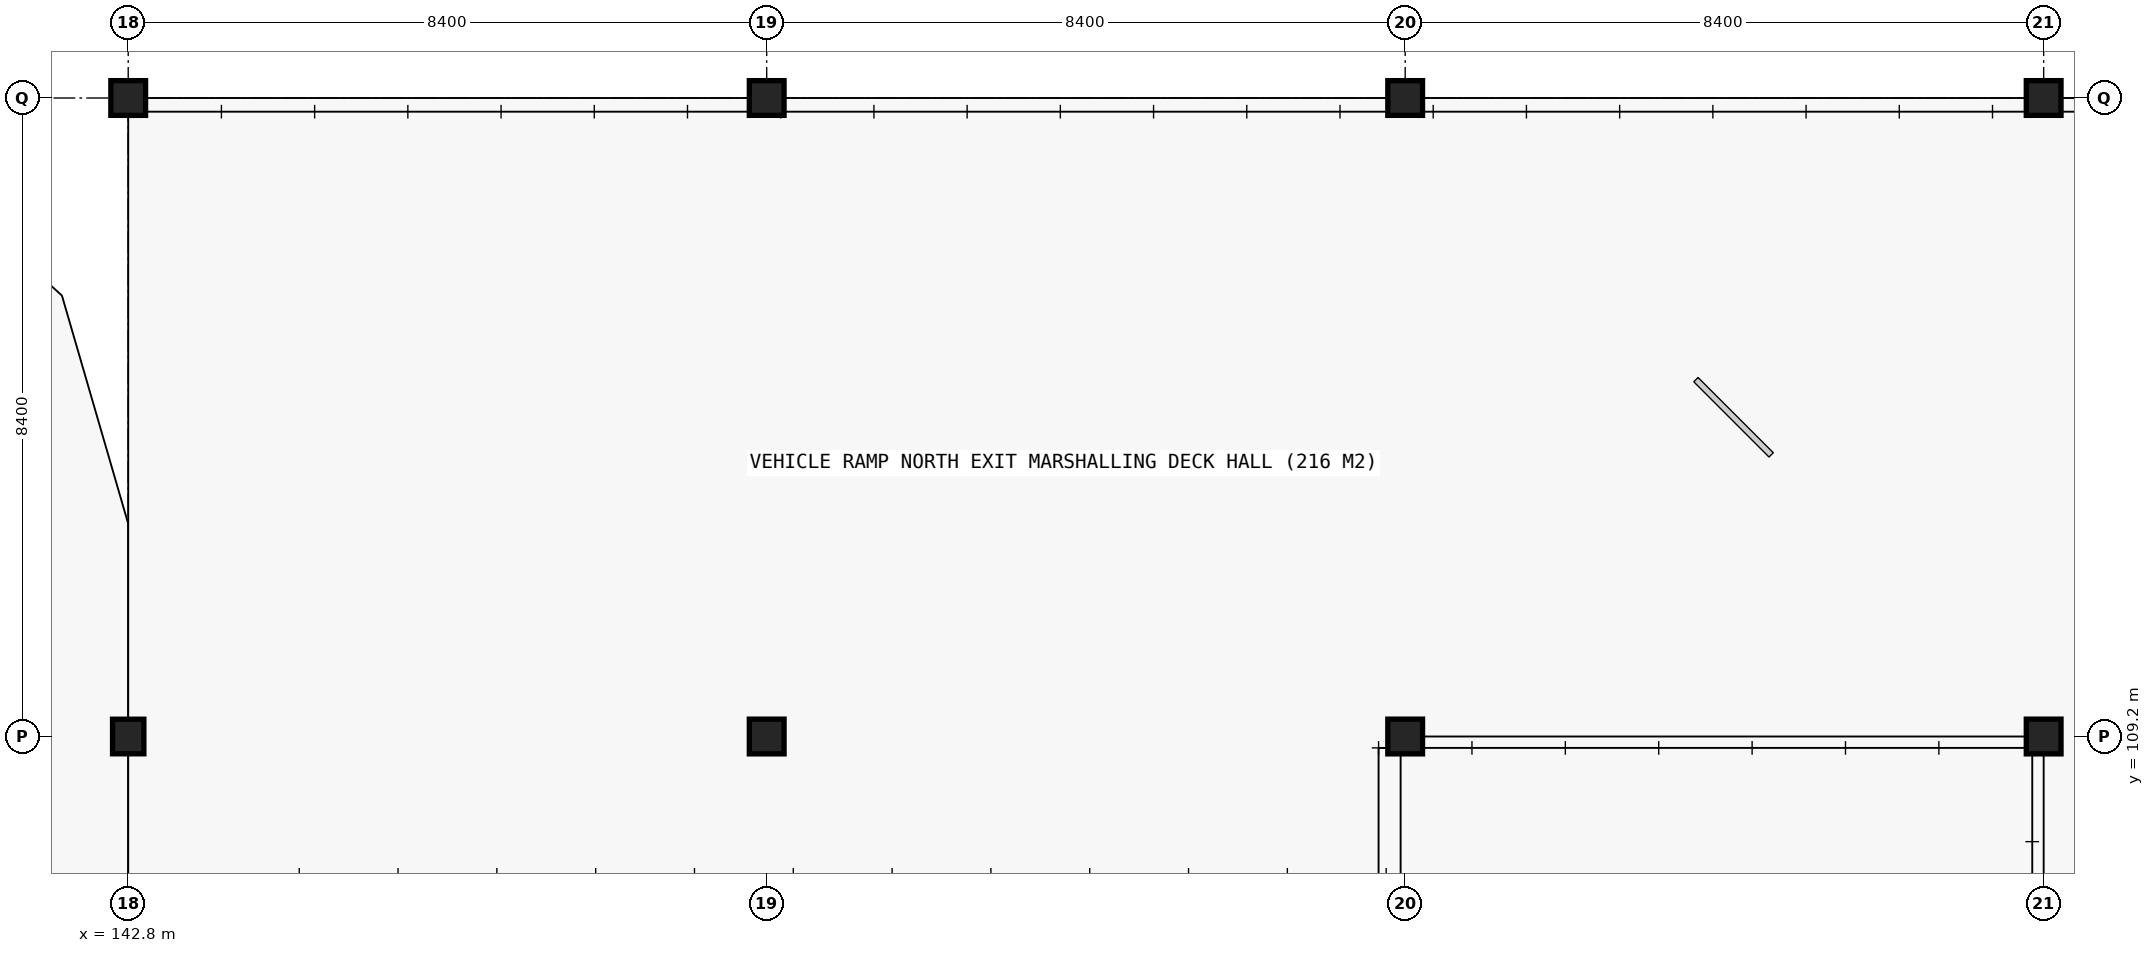
"""IFC4 building model, lengths in metres.
Left out: names, types, materials, properties, quantities, classifications, styles, units other than length and angle.
Written with IfcOpenShell. Run it as: python <this file> out.ifc"""

import sys

from ifc_helpers import new_model, si_unit, direction, frame, origin, origin_2d, place, context, subcontext, project, spatial, hollow_circle, i_section, extrude, element, save


model = new_model("IFC4")
c1 = context("Model", 3, precision=1e-05, world=origin(), true_north=direction((0.0, 1.0)))
c2 = subcontext(c1, "Body", "Model", "MODEL_VIEW")
j1 = project(units=[si_unit("LENGTHUNIT", "METRE"), si_unit("PLANEANGLEUNIT", "RADIAN")], contexts=[c1])
p1 = place(None, origin())
s1 = spatial("IfcSite", under=j1, at=p1, CompositionType="ELEMENT")
p2 = place(p1, origin())
s2 = spatial("IfcBuilding", under=s1, at=p2, CompositionType="ELEMENT")
p3 = place(p2, origin())
s3 = spatial("IfcBuildingStorey", under=s2, at=p3, CompositionType="ELEMENT", Elevation=0.0)
p4 = place(p3, frame((142.8, 109.2, 0.0), z_axis=(0.0, 0.0, 1.0), x_axis=(1.0, 0.0, 0.0)))
e1 = element("IfcColumn", 1, at=p4, inside=s3, PredefinedType="COLUMN", context=c2, shape_type="SweptSolid", body=[
    extrude(i_section(OverallWidth=0.412, OverallDepth=0.455, WebThickness=0.031, FlangeThickness=0.049, FilletRadius=0.015, at=origin_2d()), origin(), (0.0, 0.0, 1.0), 4.8),
])
for number, where, z_axis, x_axis in (
    (2, (142.8, 117.6, 0.0), (0.0, 0.0, 1.0), (1.0, 0.0, 0.0)),
    (3, (151.2, 109.2, 0.0), (0.0, 0.0, 1.0), (1.0, 0.0, 0.0)),
    (4, (151.2, 117.6, 0.0), (0.0, 0.0, 1.0), (1.0, 0.0, 0.0)),
    (5, (159.6, 109.2, 0.0), (0.0, 0.0, 1.0), (1.0, 0.0, 0.0)),
    (6, (159.6, 117.6, 0.0), (0.0, 0.0, 1.0), (1.0, 0.0, 0.0)),
    (7, (168.0, 109.2, 0.0), (0.0, 0.0, 1.0), (1.0, 0.0, 0.0)),
    (8, (168.0, 117.6, 0.0), (0.0, 0.0, 1.0), (1.0, 0.0, 0.0)),
):
    element("IfcColumn", number, at=place(p3, frame(where, z_axis=z_axis, x_axis=x_axis)), inside=s3, PredefinedType="COLUMN", context=c2, shape_type="SweptSolid", body=[
        extrude(hollow_circle(Radius=0.229, WallThickness=0.014, at=origin_2d()), origin(), (0.0, 0.0, 1.0), 4.8),
    ])
save(model, sys.argv[1])
